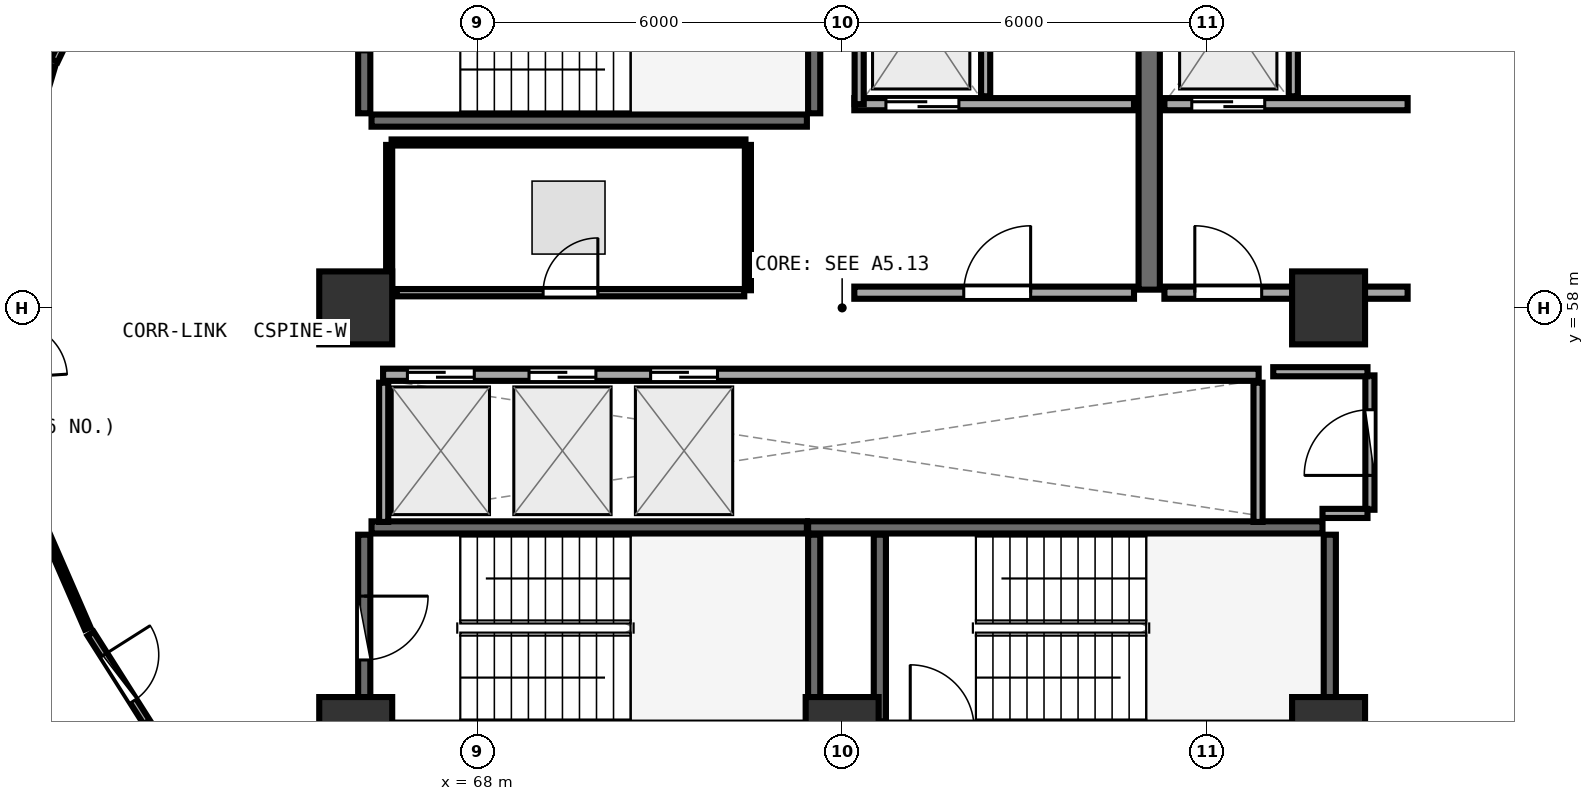
"""IFC4 building model, lengths in metres.
Left out: names, types, materials, properties, quantities, classifications, styles, units other than length and angle.
Written with IfcOpenShell. Run it as: python <this file> out.ifc"""

import sys

from ifc_helpers import new_model, si_unit, direction, frame, frame_2d, origin, origin_2d, place, context, subcontext, project, spatial, rectangle, extrude, element, fill, save


model = new_model("IFC4")
c1 = context("Model", 3, precision=1e-05, world=origin(), true_north=direction((0.0, 1.0)))
c2 = subcontext(c1, "Body", "Model", "MODEL_VIEW")
j1 = project(units=[si_unit("LENGTHUNIT", "METRE"), si_unit("PLANEANGLEUNIT", "RADIAN")], contexts=[c1])
p1 = place(None, origin())
s1 = spatial("IfcSite", under=j1, at=p1, CompositionType="ELEMENT")
p2 = place(p1, origin())
s2 = spatial("IfcBuilding", under=s1, at=p2, CompositionType="ELEMENT")
p3 = place(p2, frame((0.0, 0.0, 193.2)))
s3 = spatial("IfcBuildingStorey", under=s2, at=p3, CompositionType="ELEMENT", Elevation=193.2)
for number, where, z_axis, x_axis in (
    (1, (66.0, 51.0, 0.0), (0.0, 0.0, 1.0), (1.0, 0.0, 0.0)),
    (2, (74.0, 51.0, 0.0), (0.0, 0.0, 1.0), (1.0, 0.0, 0.0)),
    (3, (82.0, 51.0, 0.0), (0.0, 0.0, 1.0), (1.0, 0.0, 0.0)),
    (4, (82.0, 58.0, 0.0), (0.0, 0.0, 1.0), (1.0, 0.0, 0.0)),
    (5, (66.0, 58.0, 0.0), (0.0, 0.0, 1.0), (1.0, 0.0, 0.0)),
):
    element("IfcColumn", number, at=place(p3, frame(where, z_axis=z_axis, x_axis=x_axis)), inside=s3, PredefinedType="PILASTER", context=c2, shape_type="SweptSolid", body=[
        extrude(rectangle(XDim=1.2, YDim=1.2, at=origin_2d()), origin(), (0.0, 0.0, 1.0), 3.75),
    ])
p4 = place(p3, frame((66.26, 61.08, 0.0), z_axis=(0.0, 0.0, 1.0), x_axis=(1.0, 0.0, 0.0)))
e6 = element("IfcWall", 6, at=p4, inside=s3, PredefinedType="SHEAR", context=c2, shape_type="SweptSolid", body=[
    extrude(rectangle(XDim=7.16, YDim=0.2, at=frame_2d((3.58, 0.0))), origin(), (0.0, 0.0, 1.0), 3.49),
])
p5 = place(p3, frame((73.54, 61.2, 0.0), z_axis=(0.0, 0.0, 1.0), x_axis=(0.0, 1.0, 0.0)))
e7 = element("IfcWall", 7, at=p5, inside=s3, PredefinedType="SHEAR", context=c2, shape_type="SweptSolid", body=[
    extrude(rectangle(XDim=3.07, YDim=0.2, at=frame_2d((1.535, 0.0))), origin(), (0.0, 0.0, 1.0), 3.49),
])
p6 = place(p3, frame((66.14, 64.27, 0.0), z_axis=(0.0, 0.0, 1.0), x_axis=(0.0, -1.0, 0.0)))
e8 = element("IfcWall", 8, at=p6, inside=s3, PredefinedType="SHEAR", context=c2, shape_type="SweptSolid", body=[
    extrude(rectangle(XDim=3.07, YDim=0.2, at=frame_2d((1.535, 0.0))), origin(), (0.0, 0.0, 1.0), 3.49),
])
p7 = place(p6, frame((1.01, 0.0, 0.0)))
e9 = element("IfcOpeningElement", 9, at=p7, cuts=e8, PredefinedType="OPENING", context=c2, shape_type="SweptSolid", body=[
    extrude(rectangle(XDim=1.05, YDim=2.1, at=frame_2d((0.525, 1.05))), frame((0.0, 0.11, 0.0), z_axis=(0.0, -1.0, 0.0), x_axis=(1.0, 0.0, 0.0)), (0.0, 0.0, 1.0), 0.22),
])
p8 = place(p3, frame((82.02, 51.2, 0.0), z_axis=(0.0, 0.0, 1.0), x_axis=(0.0, 1.0, 0.0)))
e10 = element("IfcWall", 10, at=p8, inside=s3, PredefinedType="SHEAR", context=c2, shape_type="SweptSolid", body=[
    extrude(rectangle(XDim=3.07, YDim=0.2, at=frame_2d((1.535, 0.0))), origin(), (0.0, 0.0, 1.0), 3.49),
])
p9 = place(p3, frame((81.9, 54.39, 0.0), z_axis=(0.0, 0.0, 1.0), x_axis=(-1.0, 0.0, 0.0)))
e11 = element("IfcWall", 11, at=p9, inside=s3, PredefinedType="SHEAR", context=c2, shape_type="SweptSolid", body=[
    extrude(rectangle(XDim=8.46, YDim=0.2, at=frame_2d((4.23, 0.0))), origin(), (0.0, 0.0, 1.0), 3.49),
])
for number, where, z_axis, x_axis in (
    (12, (74.62, 54.27, 0.0), (0.0, 0.0, 1.0), (0.0, -1.0, 0.0)),
    (13, (73.54, 51.2, 0.0), (0.0, 0.0, 1.0), (0.0, 1.0, 0.0)),
):
    element("IfcWall", number, at=place(p3, frame(where, z_axis=z_axis, x_axis=x_axis)), inside=s3, PredefinedType="SHEAR", context=c2, shape_type="SweptSolid", body=[
        extrude(rectangle(XDim=3.07, YDim=0.2, at=frame_2d((1.535, 0.0))), origin(), (0.0, 0.0, 1.0), 3.49),
    ])
p10 = place(p3, frame((73.42, 54.39, 0.0), z_axis=(0.0, 0.0, 1.0), x_axis=(-1.0, 0.0, 0.0)))
e14 = element("IfcWall", 14, at=p10, inside=s3, PredefinedType="SHEAR", context=c2, shape_type="SweptSolid", body=[
    extrude(rectangle(XDim=7.16, YDim=0.2, at=frame_2d((3.58, 0.0))), origin(), (0.0, 0.0, 1.0), 3.49),
])
p11 = place(p3, frame((66.14, 54.27, 0.0), z_axis=(0.0, 0.0, 1.0), x_axis=(0.0, -1.0, 0.0)))
e15 = element("IfcWall", 15, at=p11, inside=s3, PredefinedType="SHEAR", context=c2, shape_type="SweptSolid", body=[
    extrude(rectangle(XDim=3.07, YDim=0.2, at=frame_2d((1.535, 0.0))), origin(), (0.0, 0.0, 1.0), 3.49),
])
p12 = place(p11, frame((1.01, 0.0, 0.0)))
e16 = element("IfcOpeningElement", 16, at=p12, cuts=e15, PredefinedType="OPENING", context=c2, shape_type="SweptSolid", body=[
    extrude(rectangle(XDim=1.05, YDim=2.1, at=frame_2d((0.525, 1.05))), frame((0.0, 0.11, 0.0), z_axis=(0.0, -1.0, 0.0), x_axis=(1.0, 0.0, 0.0)), (0.0, 0.0, 1.0), 0.22),
])
p13 = place(p3, frame((79.05, 58.3, 0.0), z_axis=(0.0, 0.0, 1.0), x_axis=(0.0, 1.0, 0.0)))
e17 = element("IfcWall", 17, at=p13, inside=s3, PredefinedType="SHEAR", context=c2, shape_type="SweptSolid", body=[
    extrude(rectangle(XDim=6.3, YDim=0.35, at=frame_2d((3.15, 0.0))), origin(), (0.0, 0.0, 1.0), 3.49),
])
p14 = place(p3, frame((74.2, 61.35, 0.0), z_axis=(0.0, 0.0, 1.0), x_axis=(1.0, 0.0, 0.0)))
e18 = element("IfcWall", 18, at=p14, inside=s3, PredefinedType="SOLIDWALL", context=c2, shape_type="SweptSolid", body=[
    extrude(rectangle(XDim=4.6, YDim=0.2, at=frame_2d((2.3, 0.0))), origin(), (0.0, 0.0, 1.0), 3.48),
])
p15 = place(p14, frame((0.52, 0.0, 0.0)))
e19 = element("IfcOpeningElement", 19, at=p15, cuts=e18, PredefinedType="OPENING", context=c2, shape_type="SweptSolid", body=[
    extrude(rectangle(XDim=1.2, YDim=2.15, at=frame_2d((0.6, 1.075))), frame((0.0, 0.11, 0.0), z_axis=(0.0, -1.0, 0.0), x_axis=(1.0, 0.0, 0.0)), (0.0, 0.0, 1.0), 0.22),
])
p16 = place(p3, frame((74.28, 61.35, 0.0), z_axis=(0.0, 0.0, 1.0), x_axis=(0.0, 1.0, 0.0)))
e20 = element("IfcWall", 20, at=p16, inside=s3, PredefinedType="PARTITIONING", context=c2, shape_type="SweptSolid", body=[
    extrude(rectangle(XDim=2.97, YDim=0.15, at=frame_2d((1.485, 0.0))), origin(), (0.0, 0.0, 1.0), 3.48),
])
p17 = place(p3, frame((76.36, 61.48, 0.0), z_axis=(0.0, 0.0, 1.0), x_axis=(0.0, 1.0, 0.0)))
e21 = element("IfcWall", 21, at=p17, inside=s3, PredefinedType="PARTITIONING", context=c2, shape_type="SweptSolid", body=[
    extrude(rectangle(XDim=2.84, YDim=0.15, at=frame_2d((1.42, 0.0))), origin(), (0.0, 0.0, 1.0), 3.48),
])
p18 = place(p3, frame((79.3, 61.35, 0.0), z_axis=(0.0, 0.0, 1.0), x_axis=(1.0, 0.0, 0.0)))
e22 = element("IfcWall", 22, at=p18, inside=s3, PredefinedType="SOLIDWALL", context=c2, shape_type="SweptSolid", body=[
    extrude(rectangle(XDim=4.0, YDim=0.2, at=frame_2d((2.0, 0.0))), origin(), (0.0, 0.0, 1.0), 2.775),
])
p19 = place(p18, frame((0.45, 0.0, 0.0)))
e23 = element("IfcOpeningElement", 23, at=p19, cuts=e22, PredefinedType="OPENING", context=c2, shape_type="SweptSolid", body=[
    extrude(rectangle(XDim=1.2, YDim=2.15, at=frame_2d((0.6, 1.075))), frame((0.0, 0.11, 0.0), z_axis=(0.0, -1.0, 0.0), x_axis=(1.0, 0.0, 0.0)), (0.0, 0.0, 1.0), 0.22),
])
p20 = place(p3, frame((81.42, 61.48, 0.0), z_axis=(0.0, 0.0, 1.0), x_axis=(0.0, 1.0, 0.0)))
e24 = element("IfcWall", 24, at=p20, inside=s3, PredefinedType="PARTITIONING", context=c2, shape_type="SweptSolid", body=[
    extrude(rectangle(XDim=2.84, YDim=0.15, at=frame_2d((1.42, 0.0))), origin(), (0.0, 0.0, 1.0), 3.48),
])
p21 = place(p3, frame((74.2, 58.25, 0.0), z_axis=(0.0, 0.0, 1.0), x_axis=(1.0, 0.0, 0.0)))
e25 = element("IfcWall", 25, at=p21, inside=s3, PredefinedType="SOLIDWALL", context=c2, shape_type="SweptSolid", body=[
    extrude(rectangle(XDim=4.6, YDim=0.2, at=frame_2d((2.3, 0.0))), origin(), (0.0, 0.0, 1.0), 3.48),
])
p22 = place(p21, frame((1.8, 0.0, 0.0)))
e26 = element("IfcOpeningElement", 26, at=p22, cuts=e25, PredefinedType="OPENING", context=c2, shape_type="SweptSolid", body=[
    extrude(rectangle(XDim=1.1, YDim=2.1, at=frame_2d((0.55, 1.05))), frame((0.0, 0.11, 0.0), z_axis=(0.0, -1.0, 0.0), x_axis=(1.0, 0.0, 0.0)), (0.0, 0.0, 1.0), 0.22),
])
p23 = place(p3, frame((79.3, 58.25, 0.0), z_axis=(0.0, 0.0, 1.0), x_axis=(1.0, 0.0, 0.0)))
e27 = element("IfcWall", 27, at=p23, inside=s3, PredefinedType="SOLIDWALL", context=c2, shape_type="SweptSolid", body=[
    extrude(rectangle(XDim=4.0, YDim=0.2, at=frame_2d((2.0, 0.0))), origin(), (0.0, 0.0, 1.0), 2.775),
])
p24 = place(p23, frame((0.5, 0.0, 0.0)))
e28 = element("IfcOpeningElement", 28, at=p24, cuts=e27, PredefinedType="OPENING", context=c2, shape_type="SweptSolid", body=[
    extrude(rectangle(XDim=1.1, YDim=2.1, at=frame_2d((0.55, 1.05))), frame((0.0, 0.11, 0.0), z_axis=(0.0, -1.0, 0.0), x_axis=(1.0, 0.0, 0.0)), (0.0, 0.0, 1.0), 0.22),
])
p25 = place(p3, frame((66.45, 56.9, 0.0), z_axis=(0.0, 0.0, 1.0), x_axis=(1.0, 0.0, 0.0)))
e29 = element("IfcWall", 29, at=p25, inside=s3, PredefinedType="SOLIDWALL", context=c2, shape_type="SweptSolid", body=[
    extrude(rectangle(XDim=14.4, YDim=0.2, at=frame_2d((7.2, 0.0))), origin(), (0.0, 0.0, 1.0), 3.48),
])
p26 = place(p25, frame((0.4, 0.0, 0.0)))
e30 = element("IfcOpeningElement", 30, at=p26, cuts=e29, PredefinedType="OPENING", context=c2, shape_type="SweptSolid", body=[
    extrude(rectangle(XDim=1.1, YDim=2.1, at=frame_2d((0.55, 1.05))), frame((0.0, 0.11, 0.0), z_axis=(0.0, -1.0, 0.0), x_axis=(1.0, 0.0, 0.0)), (0.0, 0.0, 1.0), 0.22),
])
p27 = place(p25, frame((2.4, 0.0, 0.0)))
e31 = element("IfcOpeningElement", 31, at=p27, cuts=e29, PredefinedType="OPENING", context=c2, shape_type="SweptSolid", body=[
    extrude(rectangle(XDim=1.1, YDim=2.1, at=frame_2d((0.55, 1.05))), frame((0.0, 0.11, 0.0), z_axis=(0.0, -1.0, 0.0), x_axis=(1.0, 0.0, 0.0)), (0.0, 0.0, 1.0), 0.22),
])
p28 = place(p25, frame((4.4, 0.0, 0.0)))
e32 = element("IfcOpeningElement", 32, at=p28, cuts=e29, PredefinedType="OPENING", context=c2, shape_type="SweptSolid", body=[
    extrude(rectangle(XDim=1.1, YDim=2.1, at=frame_2d((0.55, 1.05))), frame((0.0, 0.11, 0.0), z_axis=(0.0, -1.0, 0.0), x_axis=(1.0, 0.0, 0.0)), (0.0, 0.0, 1.0), 0.22),
])
for number, where, z_axis, x_axis in (
    (33, (66.46, 54.48, 0.0), (0.0, 0.0, 1.0), (0.0, 1.0, 0.0)),
    (34, (80.84, 54.48, 0.0), (0.0, 0.0, 1.0), (0.0, 1.0, 0.0)),
):
    element("IfcWall", number, at=place(p3, frame(where, z_axis=z_axis, x_axis=x_axis)), inside=s3, PredefinedType="PARTITIONING", context=c2, shape_type="SweptSolid", body=[
        extrude(rectangle(XDim=2.29, YDim=0.15, at=frame_2d((1.145, 0.0))), origin(), (0.0, 0.0, 1.0), 3.48),
    ])
p29 = place(p3, frame((82.68, 54.68, 0.0), z_axis=(0.0, 0.0, 1.0), x_axis=(0.0, 1.0, 0.0)))
e35 = element("IfcWall", 35, at=p29, inside=s3, PredefinedType="PARTITIONING", context=c2, shape_type="SweptSolid", body=[
    extrude(rectangle(XDim=2.21, YDim=0.15, at=frame_2d((1.105, 0.0))), origin(), (0.0, 0.0, 1.0), 3.48),
])
p30 = place(p29, frame((0.565, 0.0, 0.0)))
e36 = element("IfcOpeningElement", 36, at=p30, cuts=e35, PredefinedType="OPENING", context=c2, shape_type="SweptSolid", body=[
    extrude(rectangle(XDim=1.08, YDim=2.1, at=frame_2d((0.54, 1.05))), frame((0.0, 0.085, 0.0), z_axis=(0.0, -1.0, 0.0), x_axis=(1.0, 0.0, 0.0)), (0.0, 0.0, 1.0), 0.17),
])
p31 = place(p3, frame((66.675, 58.25, 0.0), z_axis=(0.0, 0.0, 1.0), x_axis=(1.0, 0.0, 0.0)))
e37 = element("IfcWall", 37, at=p31, inside=s3, PredefinedType="PARTITIONING", context=c2, shape_type="SweptSolid", body=[
    extrude(rectangle(XDim=5.715, YDim=0.12, at=frame_2d((2.857, 0.0))), origin(), (0.0, 0.0, 1.0), 3.48),
])
p32 = place(p31, frame((2.407, 0.0, 0.0)))
e38 = element("IfcOpeningElement", 38, at=p32, cuts=e37, PredefinedType="OPENING", context=c2, shape_type="SweptSolid", body=[
    extrude(rectangle(XDim=0.9, YDim=2.08, at=frame_2d((0.45, 1.04))), frame((0.0, 0.07, 0.0), z_axis=(0.0, -1.0, 0.0), x_axis=(1.0, 0.0, 0.0)), (0.0, 0.0, 1.0), 0.14),
])
p33 = place(p3, frame((61.778, 63.609, 0.0), z_axis=(0.0, 0.0, 1.0), x_axis=(-0.430372132133, -0.902651553969, 0.0)))
e39 = element("IfcWall", 39, at=p33, inside=s3, PredefinedType="PARTITIONING", context=c2, shape_type="SweptSolid", body=[
    extrude(rectangle(XDim=1.707, YDim=0.12, at=frame_2d((0.854, 0.0))), origin(), (0.0, 0.0, 1.0), 3.235),
])
p34 = place(p33, frame((0.403, 0.0, 0.0)))
e40 = element("IfcOpeningElement", 40, at=p34, cuts=e39, PredefinedType="OPENING", context=c2, shape_type="SweptSolid", body=[
    extrude(rectangle(XDim=0.9, YDim=2.08, at=frame_2d((0.45, 1.04))), frame((0.0, 0.07, 0.0), z_axis=(0.0, -1.0, 0.0), x_axis=(1.0, 0.0, 0.0)), (0.0, 0.0, 1.0), 0.14),
])
p35 = place(p3, frame((61.64, 52.641, 0.0), z_axis=(0.0, 0.0, 1.0), x_axis=(0.535610965059, -0.844464856645, 0.0)))
e41 = element("IfcWall", 41, at=p35, inside=s3, PredefinedType="PARTITIONING", context=c2, shape_type="SweptSolid", body=[
    extrude(rectangle(XDim=1.725, YDim=0.12, at=frame_2d((0.862, 0.0))), origin(), (0.0, 0.0, 1.0), 3.025),
])
p36 = place(p35, frame((0.412, 0.0, 0.0)))
e42 = element("IfcOpeningElement", 42, at=p36, cuts=e41, PredefinedType="OPENING", context=c2, shape_type="SweptSolid", body=[
    extrude(rectangle(XDim=0.9, YDim=2.08, at=frame_2d((0.45, 1.04))), frame((0.0, 0.07, 0.0), z_axis=(0.0, -1.0, 0.0), x_axis=(1.0, 0.0, 0.0)), (0.0, 0.0, 1.0), 0.14),
])
p37 = place(p3, frame((81.9, 54.62, 0.0), z_axis=(0.0, 0.0, 1.0), x_axis=(1.0, 0.0, 0.0)))
e43 = element("IfcWall", 43, at=p37, inside=s3, PredefinedType="PARTITIONING", context=c2, shape_type="SweptSolid", body=[
    extrude(rectangle(XDim=0.74, YDim=0.15, at=frame_2d((0.37, 0.0))), origin(), (0.0, 0.0, 1.0), 2.775),
])
p38 = place(p3, frame((82.64, 56.95, 0.0), z_axis=(0.0, 0.0, 1.0), x_axis=(-1.0, 0.0, 0.0)))
e44 = element("IfcWall", 44, at=p38, inside=s3, PredefinedType="PARTITIONING", context=c2, shape_type="SweptSolid", body=[
    extrude(rectangle(XDim=1.55, YDim=0.15, at=frame_2d((0.775, 0.0))), origin(), (0.0, 0.0, 1.0), 2.775),
])
p39 = place(p3, frame((72.45, 58.29, 0.0), z_axis=(0.0, 0.0, 1.0), x_axis=(0.0, 1.0, 0.0)))
e45 = element("IfcWall", 45, at=p39, inside=s3, PredefinedType="PARTITIONING", context=c2, shape_type="SweptSolid", body=[
    extrude(rectangle(XDim=2.39, YDim=0.1, at=frame_2d((1.195, 0.0))), origin(), (0.0, 0.0, 1.0), 3.48),
])
p40 = place(p3, frame((72.41, 60.72, 0.0), z_axis=(0.0, 0.0, 1.0), x_axis=(-1.0, 0.0, 0.0)))
e46 = element("IfcWall", 46, at=p40, inside=s3, PredefinedType="PARTITIONING", context=c2, shape_type="SweptSolid", body=[
    extrude(rectangle(XDim=5.82, YDim=0.1, at=frame_2d((2.91, 0.0))), origin(), (0.0, 0.0, 1.0), 3.48),
])
p41 = place(p3, frame((66.55, 60.68, 0.0), z_axis=(0.0, 0.0, 1.0), x_axis=(0.0, -1.0, 0.0)))
e47 = element("IfcWall", 47, at=p41, inside=s3, PredefinedType="PARTITIONING", context=c2, shape_type="SweptSolid", body=[
    extrude(rectangle(XDim=2.383, YDim=0.1, at=frame_2d((1.191, 0.0))), origin(), (0.0, 0.0, 1.0), 3.48),
])
p42 = place(p3, frame((81.517, 47.692, 0.0), z_axis=(0.0, 0.0, 1.0), x_axis=(0.730053355202, 0.683390151055, 0.0)))
e48 = element("IfcWall", 48, at=p42, inside=s3, PredefinedType="PARTITIONING", context=c2, shape_type="SweptSolid", body=[
    extrude(rectangle(XDim=5.839, YDim=0.1, at=frame_2d((2.919, 0.0))), origin(), (0.0, 0.0, 1.0), 3.025),
])
p43 = place(p3, frame((61.007, 61.976, 0.0), z_axis=(0.0, 0.0, 1.0), x_axis=(-0.282778653399, -0.959185192328, 0.0)))
e49 = element("IfcWall", 49, at=p43, inside=s3, PredefinedType="PARTITIONING", context=c2, shape_type="SweptSolid", body=[
    extrude(rectangle(XDim=1.727, YDim=0.1, at=frame_2d((0.863, 0.0))), origin(), (0.0, 0.0, 1.0), 3.48),
])
p44 = place(p3, frame((60.897, 54.325, 0.0), z_axis=(0.0, 0.0, 1.0), x_axis=(0.399192626392, -0.916867082534, 0.0)))
e50 = element("IfcWall", 50, at=p44, inside=s3, PredefinedType="PARTITIONING", context=c2, shape_type="SweptSolid", body=[
    extrude(rectangle(XDim=1.741, YDim=0.1, at=frame_2d((0.871, 0.0))), origin(), (0.0, 0.0, 1.0), 3.235),
])
p45 = place(p12, origin())
e51 = element("IfcDoor", 51, at=p45, inside=s3, OperationType="SINGLE_SWING_LEFT", PredefinedType="DOOR", context=c2, shape_type="SweptSolid", body=[
    extrude(rectangle(XDim=1.05, YDim=2.1, at=frame_2d((0.525, 1.05))), frame((0.0, 0.025, 0.0), z_axis=(0.0, -1.0, 0.0), x_axis=(1.0, 0.0, 0.0)), (0.0, 0.0, 1.0), 0.05),
])
fill(e16, e51)
p46 = place(p15, origin())
e52 = element("IfcDoor", 52, at=p46, inside=s3, OperationType="DOUBLE_DOOR_SLIDING", PredefinedType="DOOR", context=c2, shape_type="SweptSolid", body=[
    extrude(rectangle(XDim=1.2, YDim=2.15, at=frame_2d((0.6, 1.075))), frame((0.0, 0.025, 0.0), z_axis=(0.0, -1.0, 0.0), x_axis=(1.0, 0.0, 0.0)), (0.0, 0.0, 1.0), 0.05),
])
fill(e19, e52)
p47 = place(p19, origin())
e53 = element("IfcDoor", 53, at=p47, inside=s3, OperationType="DOUBLE_DOOR_SLIDING", PredefinedType="DOOR", context=c2, shape_type="SweptSolid", body=[
    extrude(rectangle(XDim=1.2, YDim=2.15, at=frame_2d((0.6, 1.075))), frame((0.0, 0.025, 0.0), z_axis=(0.0, -1.0, 0.0), x_axis=(1.0, 0.0, 0.0)), (0.0, 0.0, 1.0), 0.05),
])
fill(e23, e53)
p48 = place(p22, frame((1.1, 0.0, 0.0), z_axis=(0.0, 0.0, 1.0), x_axis=(-1.0, 0.0, 0.0)))
e54 = element("IfcDoor", 54, at=p48, inside=s3, OperationType="SINGLE_SWING_LEFT", PredefinedType="DOOR", context=c2, shape_type="SweptSolid", body=[
    extrude(rectangle(XDim=1.1, YDim=2.1, at=frame_2d((0.55, 1.05))), frame((0.0, 0.025, 0.0), z_axis=(0.0, -1.0, 0.0), x_axis=(1.0, 0.0, 0.0)), (0.0, 0.0, 1.0), 0.05),
])
fill(e26, e54)
p49 = place(p24, frame((1.1, 0.0, 0.0), z_axis=(0.0, 0.0, 1.0), x_axis=(-1.0, 0.0, 0.0)))
e55 = element("IfcDoor", 55, at=p49, inside=s3, OperationType="SINGLE_SWING_RIGHT", PredefinedType="DOOR", context=c2, shape_type="SweptSolid", body=[
    extrude(rectangle(XDim=1.1, YDim=2.1, at=frame_2d((0.55, 1.05))), frame((0.0, 0.025, 0.0), z_axis=(0.0, -1.0, 0.0), x_axis=(1.0, 0.0, 0.0)), (0.0, 0.0, 1.0), 0.05),
])
fill(e28, e55)
p50 = place(p26, origin())
e56 = element("IfcDoor", 56, at=p50, inside=s3, OperationType="DOUBLE_DOOR_SLIDING", PredefinedType="DOOR", context=c2, shape_type="SweptSolid", body=[
    extrude(rectangle(XDim=1.1, YDim=2.1, at=frame_2d((0.55, 1.05))), frame((0.0, 0.025, 0.0), z_axis=(0.0, -1.0, 0.0), x_axis=(1.0, 0.0, 0.0)), (0.0, 0.0, 1.0), 0.05),
])
fill(e30, e56)
p51 = place(p27, origin())
e57 = element("IfcDoor", 57, at=p51, inside=s3, OperationType="DOUBLE_DOOR_SLIDING", PredefinedType="DOOR", context=c2, shape_type="SweptSolid", body=[
    extrude(rectangle(XDim=1.1, YDim=2.1, at=frame_2d((0.55, 1.05))), frame((0.0, 0.025, 0.0), z_axis=(0.0, -1.0, 0.0), x_axis=(1.0, 0.0, 0.0)), (0.0, 0.0, 1.0), 0.05),
])
fill(e31, e57)
p52 = place(p28, origin())
e58 = element("IfcDoor", 58, at=p52, inside=s3, OperationType="DOUBLE_DOOR_SLIDING", PredefinedType="DOOR", context=c2, shape_type="SweptSolid", body=[
    extrude(rectangle(XDim=1.1, YDim=2.1, at=frame_2d((0.55, 1.05))), frame((0.0, 0.025, 0.0), z_axis=(0.0, -1.0, 0.0), x_axis=(1.0, 0.0, 0.0)), (0.0, 0.0, 1.0), 0.05),
])
fill(e32, e58)
p53 = place(p30, origin())
e59 = element("IfcDoor", 59, at=p53, inside=s3, OperationType="SINGLE_SWING_LEFT", PredefinedType="DOOR", context=c2, shape_type="SweptSolid", body=[
    extrude(rectangle(XDim=1.08, YDim=2.1, at=frame_2d((0.54, 1.05))), frame((0.0, 0.025, 0.0), z_axis=(0.0, -1.0, 0.0), x_axis=(1.0, 0.0, 0.0)), (0.0, 0.0, 1.0), 0.05),
])
fill(e36, e59)
p54 = place(p32, origin())
e60 = element("IfcDoor", 60, at=p54, inside=s3, OperationType="SINGLE_SWING_RIGHT", PredefinedType="DOOR", context=c2, shape_type="SweptSolid", body=[
    extrude(rectangle(XDim=0.9, YDim=2.08, at=frame_2d((0.45, 1.04))), frame((0.0, 0.025, 0.0), z_axis=(0.0, -1.0, 0.0), x_axis=(1.0, 0.0, 0.0)), (0.0, 0.0, 1.0), 0.05),
])
fill(e38, e60)
p55 = place(p36, origin())
e61 = element("IfcDoor", 61, at=p55, inside=s3, OperationType="SINGLE_SWING_LEFT", PredefinedType="DOOR", context=c2, shape_type="SweptSolid", body=[
    extrude(rectangle(XDim=0.9, YDim=2.08, at=frame_2d((0.45, 1.04))), frame((0.0, 0.025, 0.0), z_axis=(0.0, -1.0, 0.0), x_axis=(1.0, 0.0, 0.0)), (0.0, 0.0, 1.0), 0.05),
])
fill(e42, e61)
save(model, sys.argv[1])
